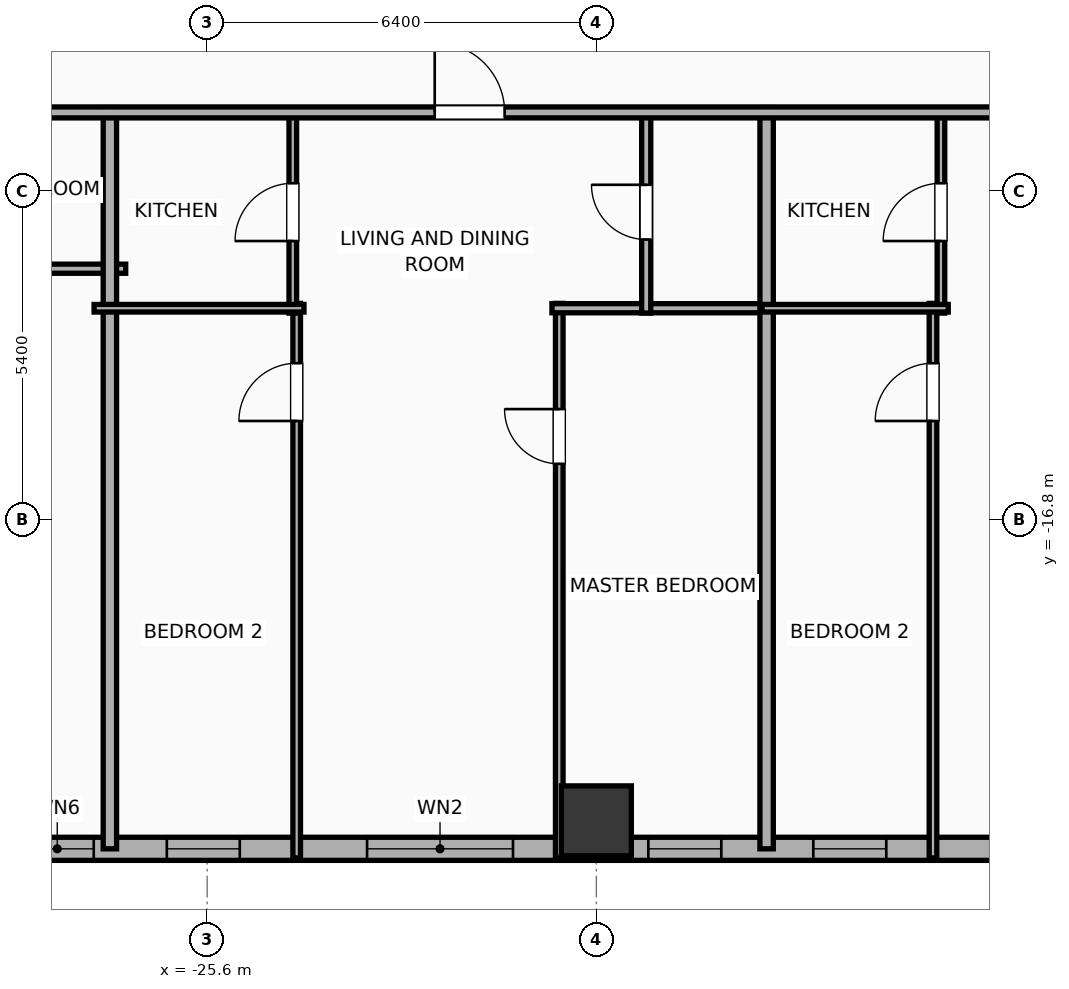
"""IFC4 building model, lengths in metres.
Left out: names, types, materials, properties, quantities, classifications, styles, units other than length and angle.
Written with IfcOpenShell. Run it as: python <this file> out.ifc"""

import sys

from ifc_helpers import new_model, si_unit, direction, frame, frame_2d, origin, origin_2d, place, context, subcontext, project, spatial, rectangle, hollow_rectangle, extrude, element, fill, save


model = new_model("IFC4")
c1 = context("Model", 3, precision=1e-05, world=origin(), true_north=direction((0.0, 1.0)))
c2 = subcontext(c1, "Body", "Model", "MODEL_VIEW")
j1 = project(units=[si_unit("LENGTHUNIT", "METRE"), si_unit("PLANEANGLEUNIT", "RADIAN")], contexts=[c1])
p1 = place(None, origin())
s1 = spatial("IfcSite", under=j1, at=p1, CompositionType="ELEMENT")
p2 = place(p1, origin())
s2 = spatial("IfcBuilding", under=s1, at=p2, CompositionType="ELEMENT")
p3 = place(p2, frame((0.0, 0.0, 41.6)))
s3 = spatial("IfcBuildingStorey", under=s2, at=p3, CompositionType="ELEMENT", Elevation=41.6)
p4 = place(p3, frame((-19.2, -21.75, 0.0), z_axis=(0.0, 0.0, 1.0), x_axis=(1.0, 0.0, 0.0)))
e1 = element("IfcColumn", 1, at=p4, inside=s3, PredefinedType="COLUMN", context=c2, shape_type="SweptSolid", body=[
    extrude(hollow_rectangle(XDim=1.15, YDim=1.15, WallThickness=0.04, at=origin_2d()), origin(), (0.0, 0.0, 1.0), 3.9),
])
p5 = place(p3, frame((22.381, -22.21, 0.0), z_axis=(0.0, 0.0, 1.0), x_axis=(-1.0, 0.0, 0.0)))
e2 = element("IfcWall", 2, at=p5, inside=s3, PredefinedType="ELEMENTEDWALL", context=c2, shape_type="SweptSolid", body=[
    extrude(rectangle(XDim=51.963, YDim=0.38, at=frame_2d((25.981, 0.0))), origin(), (0.0, 0.0, 1.0), 3.65),
])
p6 = place(p5, frame((42.952, 0.0, 0.75)))
e3 = element("IfcOpeningElement", 3, at=p6, cuts=e2, PredefinedType="OPENING", context=c2, shape_type="SweptSolid", body=[
    extrude(rectangle(XDim=2.4, YDim=2.1, at=frame_2d((1.2, 1.05))), frame((0.0, 0.2, 0.0), z_axis=(0.0, -1.0, 0.0), x_axis=(1.0, 0.0, 0.0)), (0.0, 0.0, 1.0), 0.4),
])
p7 = place(p5, frame((49.847, 0.0, 0.75)))
e4 = element("IfcOpeningElement", 4, at=p7, cuts=e2, PredefinedType="OPENING", context=c2, shape_type="SweptSolid", body=[
    extrude(rectangle(XDim=1.2, YDim=2.05, at=frame_2d((0.6, 1.025))), frame((0.0, 0.2, 0.0), z_axis=(0.0, -1.0, 0.0), x_axis=(1.0, 0.0, 0.0)), (0.0, 0.0, 1.0), 0.4),
])
p8 = place(p5, frame((47.445, 0.0, 0.75)))
e5 = element("IfcOpeningElement", 5, at=p8, cuts=e2, PredefinedType="OPENING", context=c2, shape_type="SweptSolid", body=[
    extrude(rectangle(XDim=1.2, YDim=2.05, at=frame_2d((0.6, 1.025))), frame((0.0, 0.2, 0.0), z_axis=(0.0, -1.0, 0.0), x_axis=(1.0, 0.0, 0.0)), (0.0, 0.0, 1.0), 0.4),
])
p9 = place(p5, frame((39.526, 0.0, 0.75)))
e6 = element("IfcOpeningElement", 6, at=p9, cuts=e2, PredefinedType="OPENING", context=c2, shape_type="SweptSolid", body=[
    extrude(rectangle(XDim=1.2, YDim=2.05, at=frame_2d((0.6, 1.025))), frame((0.0, 0.2, 0.0), z_axis=(0.0, -1.0, 0.0), x_axis=(1.0, 0.0, 0.0)), (0.0, 0.0, 1.0), 0.4),
])
p10 = place(p5, frame((33.018, 0.0, 0.75)))
e7 = element("IfcOpeningElement", 7, at=p10, cuts=e2, PredefinedType="OPENING", context=c2, shape_type="SweptSolid", body=[
    extrude(rectangle(XDim=1.2, YDim=2.05, at=frame_2d((0.6, 1.025))), frame((0.0, 0.2, 0.0), z_axis=(0.0, -1.0, 0.0), x_axis=(1.0, 0.0, 0.0)), (0.0, 0.0, 1.0), 0.4),
])
p11 = place(p5, frame((36.813, 0.0, 0.75)))
e8 = element("IfcOpeningElement", 8, at=p11, cuts=e2, PredefinedType="OPENING", context=c2, shape_type="SweptSolid", body=[
    extrude(rectangle(XDim=1.2, YDim=2.05, at=frame_2d((0.6, 1.025))), frame((0.0, 0.2, 0.0), z_axis=(0.0, -1.0, 0.0), x_axis=(1.0, 0.0, 0.0)), (0.0, 0.0, 1.0), 0.4),
])
p12 = place(p5, frame((28.886, 0.0, 0.75)))
e9 = element("IfcOpeningElement", 9, at=p12, cuts=e2, PredefinedType="OPENING", context=c2, shape_type="SweptSolid", body=[
    extrude(rectangle(XDim=1.2, YDim=2.05, at=frame_2d((0.6, 1.025))), frame((0.0, 0.2, 0.0), z_axis=(0.0, -1.0, 0.0), x_axis=(1.0, 0.0, 0.0)), (0.0, 0.0, 1.0), 0.4),
])
p13 = place(p5, frame((23.306, 0.0, 0.75)))
e10 = element("IfcOpeningElement", 10, at=p13, cuts=e2, PredefinedType="OPENING", context=c2, shape_type="SweptSolid", body=[
    extrude(rectangle(XDim=1.2, YDim=2.05, at=frame_2d((0.6, 1.025))), frame((0.0, 0.2, 0.0), z_axis=(0.0, -1.0, 0.0), x_axis=(1.0, 0.0, 0.0)), (0.0, 0.0, 1.0), 0.4),
])
p14 = place(p5, frame((26.056, 0.0, 0.75)))
e11 = element("IfcOpeningElement", 11, at=p14, cuts=e2, PredefinedType="OPENING", context=c2, shape_type="SweptSolid", body=[
    extrude(rectangle(XDim=1.2, YDim=2.05, at=frame_2d((0.6, 1.025))), frame((0.0, 0.2, 0.0), z_axis=(0.0, -1.0, 0.0), x_axis=(1.0, 0.0, 0.0)), (0.0, 0.0, 1.0), 0.4),
])
p15 = place(p5, frame((18.811, 0.0, 0.75)))
e12 = element("IfcOpeningElement", 12, at=p15, cuts=e2, PredefinedType="OPENING", context=c2, shape_type="SweptSolid", body=[
    extrude(rectangle(XDim=1.2, YDim=2.05, at=frame_2d((0.6, 1.025))), frame((0.0, 0.2, 0.0), z_axis=(0.0, -1.0, 0.0), x_axis=(1.0, 0.0, 0.0)), (0.0, 0.0, 1.0), 0.4),
])
p16 = place(p5, frame((14.602, 0.0, 0.75)))
e13 = element("IfcOpeningElement", 13, at=p16, cuts=e2, PredefinedType="OPENING", context=c2, shape_type="SweptSolid", body=[
    extrude(rectangle(XDim=1.2, YDim=2.05, at=frame_2d((0.6, 1.025))), frame((0.0, 0.2, 0.0), z_axis=(0.0, -1.0, 0.0), x_axis=(1.0, 0.0, 0.0)), (0.0, 0.0, 1.0), 0.4),
])
p17 = place(p5, frame((11.852, 0.0, 0.75)))
e14 = element("IfcOpeningElement", 14, at=p17, cuts=e2, PredefinedType="OPENING", context=c2, shape_type="SweptSolid", body=[
    extrude(rectangle(XDim=1.2, YDim=2.05, at=frame_2d((0.6, 1.025))), frame((0.0, 0.2, 0.0), z_axis=(0.0, -1.0, 0.0), x_axis=(1.0, 0.0, 0.0)), (0.0, 0.0, 1.0), 0.4),
])
p18 = place(p5, frame((8.316, 0.0, 0.75)))
e15 = element("IfcOpeningElement", 15, at=p18, cuts=e2, PredefinedType="OPENING", context=c2, shape_type="SweptSolid", body=[
    extrude(rectangle(XDim=1.2, YDim=2.05, at=frame_2d((0.6, 1.025))), frame((0.0, 0.2, 0.0), z_axis=(0.0, -1.0, 0.0), x_axis=(1.0, 0.0, 0.0)), (0.0, 0.0, 1.0), 0.4),
])
p19 = place(p5, frame((6.286, 0.0, 0.75)))
e16 = element("IfcOpeningElement", 16, at=p19, cuts=e2, PredefinedType="OPENING", context=c2, shape_type="SweptSolid", body=[
    extrude(rectangle(XDim=1.2, YDim=2.05, at=frame_2d((0.6, 1.025))), frame((0.0, 0.2, 0.0), z_axis=(0.0, -1.0, 0.0), x_axis=(1.0, 0.0, 0.0)), (0.0, 0.0, 1.0), 0.4),
])
p20 = place(p5, frame((3.737, 0.0, 0.75)))
e17 = element("IfcOpeningElement", 17, at=p20, cuts=e2, PredefinedType="OPENING", context=c2, shape_type="SweptSolid", body=[
    extrude(rectangle(XDim=1.2, YDim=2.05, at=frame_2d((0.6, 1.025))), frame((0.0, 0.2, 0.0), z_axis=(0.0, -1.0, 0.0), x_axis=(1.0, 0.0, 0.0)), (0.0, 0.0, 1.0), 0.4),
])
p21 = place(p5, frame((1.291, 0.0, 0.75)))
e18 = element("IfcOpeningElement", 18, at=p21, cuts=e2, PredefinedType="OPENING", context=c2, shape_type="SweptSolid", body=[
    extrude(rectangle(XDim=1.2, YDim=2.05, at=frame_2d((0.6, 1.025))), frame((0.0, 0.2, 0.0), z_axis=(0.0, -1.0, 0.0), x_axis=(1.0, 0.0, 0.0)), (0.0, 0.0, 1.0), 0.4),
])
p22 = place(p3, frame((-29.414, -12.67, 0.0), z_axis=(0.0, 0.0, 1.0), x_axis=(1.0, 0.0, 0.0)))
e19 = element("IfcWall", 19, at=p22, inside=s3, PredefinedType="PLUMBINGWALL", context=c2, shape_type="SweptSolid", body=[
    extrude(rectangle(XDim=2.474, YDim=0.15, at=frame_2d((1.237, 0.0))), origin(), (0.0, 0.0, 1.0), 3.65),
])
p23 = place(p3, frame((-27.2, -22.21, 0.0), z_axis=(0.0, 0.0, 1.0), x_axis=(0.0, 1.0, 0.0)))
e20 = element("IfcWall", 20, at=p23, inside=s3, PredefinedType="PARTITIONING", context=c2, shape_type="SweptSolid", body=[
    extrude(rectangle(XDim=12.19, YDim=0.22, at=frame_2d((6.095, 0.0))), origin(), (0.0, 0.0, 1.0), 3.65),
])
p24 = place(p3, frame((-24.128, -22.36, 0.0), z_axis=(0.0, 0.0, 1.0), x_axis=(0.0, 1.0, 0.0)))
e21 = element("IfcWall", 21, at=p24, inside=s3, PredefinedType="PARTITIONING", context=c2, shape_type="SweptSolid", body=[
    extrude(rectangle(XDim=9.12, YDim=0.125, at=frame_2d((4.56, 0.0))), origin(), (0.0, 0.0, 1.0), 3.65),
])
p25 = place(p24, frame((7.186, 0.0, 0.0)))
e22 = element("IfcOpeningElement", 22, at=p25, cuts=e21, PredefinedType="OPENING", context=c2, shape_type="SweptSolid", body=[
    extrude(rectangle(XDim=0.95, YDim=2.05, at=frame_2d((0.475, 1.025))), frame((0.0, 0.073, 0.0), z_axis=(0.0, -1.0, 0.0), x_axis=(1.0, 0.0, 0.0)), (0.0, 0.0, 1.0), 0.145),
])
p26 = place(p3, frame((-19.81, -22.36, 0.0), z_axis=(0.0, 0.0, 1.0), x_axis=(0.0, 1.0, 0.0)))
e23 = element("IfcWall", 23, at=p26, inside=s3, PredefinedType="PARTITIONING", context=c2, shape_type="SweptSolid", body=[
    extrude(rectangle(XDim=9.12, YDim=0.125, at=frame_2d((4.56, 0.0))), origin(), (0.0, 0.0, 1.0), 3.65),
])
p27 = place(p26, frame((6.481, 0.0, 0.0)))
e24 = element("IfcOpeningElement", 24, at=p27, cuts=e23, PredefinedType="OPENING", context=c2, shape_type="SweptSolid", body=[
    extrude(rectangle(XDim=0.9, YDim=2.05, at=frame_2d((0.45, 1.025))), frame((0.0, 0.073, 0.0), z_axis=(0.0, -1.0, 0.0), x_axis=(1.0, 0.0, 0.0)), (0.0, 0.0, 1.0), 0.145),
])
p28 = place(p3, frame((-19.93, -13.32, 0.0), z_axis=(0.0, 0.0, 1.0), x_axis=(1.0, 0.0, 0.0)))
e25 = element("IfcWall", 25, at=p28, inside=s3, PredefinedType="PLUMBINGWALL", context=c2, shape_type="SweptSolid", body=[
    extrude(rectangle(XDim=3.605, YDim=0.15, at=frame_2d((1.802, 0.0))), origin(), (0.0, 0.0, 1.0), 3.65),
])
p29 = place(p3, frame((-24.192, -13.4, 0.0), z_axis=(0.0, 0.0, 1.0), x_axis=(0.0, 1.0, 0.0)))
e26 = element("IfcWall", 26, at=p29, inside=s3, PredefinedType="PARTITIONING", context=c2, shape_type="SweptSolid", body=[
    extrude(rectangle(XDim=3.32, YDim=0.125, at=frame_2d((1.66, 0.0))), origin(), (0.0, 0.0, 1.0), 3.65),
])
p30 = place(p29, frame((1.185, 0.0, 0.0)))
e27 = element("IfcOpeningElement", 27, at=p30, cuts=e26, PredefinedType="OPENING", context=c2, shape_type="SweptSolid", body=[
    extrude(rectangle(XDim=0.95, YDim=2.05, at=frame_2d((0.475, 1.025))), frame((0.0, 0.073, 0.0), z_axis=(0.0, -1.0, 0.0), x_axis=(1.0, 0.0, 0.0)), (0.0, 0.0, 1.0), 0.145),
])
p31 = place(p3, frame((-27.46, -13.32, 0.0), z_axis=(0.0, 0.0, 1.0), x_axis=(1.0, 0.0, 0.0)))
e28 = element("IfcWall", 28, at=p31, inside=s3, PredefinedType="PARTITIONING", context=c2, shape_type="SweptSolid", body=[
    extrude(rectangle(XDim=3.452, YDim=0.125, at=frame_2d((1.726, 0.0))), origin(), (0.0, 0.0, 1.0), 3.65),
])
p32 = place(p3, frame((-18.38, -13.4, 0.0), z_axis=(0.0, 0.0, 1.0), x_axis=(0.0, 1.0, 0.0)))
e29 = element("IfcWall", 29, at=p32, inside=s3, PredefinedType="PLUMBINGWALL", context=c2, shape_type="SweptSolid", body=[
    extrude(rectangle(XDim=3.32, YDim=0.15, at=frame_2d((1.66, 0.0))), origin(), (0.0, 0.0, 1.0), 3.65),
])
p33 = place(p32, frame((1.21, 0.0, 0.0)))
e30 = element("IfcOpeningElement", 30, at=p33, cuts=e29, PredefinedType="OPENING", context=c2, shape_type="SweptSolid", body=[
    extrude(rectangle(XDim=0.9, YDim=2.05, at=frame_2d((0.45, 1.025))), frame((0.0, 0.085, 0.0), z_axis=(0.0, -1.0, 0.0), x_axis=(1.0, 0.0, 0.0)), (0.0, 0.0, 1.0), 0.17),
])
p34 = place(p3, frame((-16.4, -22.21, 0.0), z_axis=(0.0, 0.0, 1.0), x_axis=(0.0, 1.0, 0.0)))
e31 = element("IfcWall", 31, at=p34, inside=s3, PredefinedType="PARTITIONING", context=c2, shape_type="SweptSolid", body=[
    extrude(rectangle(XDim=12.19, YDim=0.22, at=frame_2d((6.095, 0.0))), origin(), (0.0, 0.0, 1.0), 3.65),
])
p35 = place(p3, frame((-13.664, -22.36, 0.0), z_axis=(0.0, 0.0, 1.0), x_axis=(0.0, 1.0, 0.0)))
e32 = element("IfcWall", 32, at=p35, inside=s3, PredefinedType="PARTITIONING", context=c2, shape_type="SweptSolid", body=[
    extrude(rectangle(XDim=9.12, YDim=0.125, at=frame_2d((4.56, 0.0))), origin(), (0.0, 0.0, 1.0), 3.65),
])
p36 = place(p35, frame((7.186, 0.0, 0.0)))
e33 = element("IfcOpeningElement", 33, at=p36, cuts=e32, PredefinedType="OPENING", context=c2, shape_type="SweptSolid", body=[
    extrude(rectangle(XDim=0.95, YDim=2.05, at=frame_2d((0.475, 1.025))), frame((0.0, 0.073, 0.0), z_axis=(0.0, -1.0, 0.0), x_axis=(1.0, 0.0, 0.0)), (0.0, 0.0, 1.0), 0.145),
])
p37 = place(p3, frame((-13.533, -13.4, 0.0), z_axis=(0.0, 0.0, 1.0), x_axis=(0.0, 1.0, 0.0)))
e34 = element("IfcWall", 34, at=p37, inside=s3, PredefinedType="PARTITIONING", context=c2, shape_type="SweptSolid", body=[
    extrude(rectangle(XDim=3.32, YDim=0.125, at=frame_2d((1.66, 0.0))), origin(), (0.0, 0.0, 1.0), 3.65),
])
p38 = place(p37, frame((1.185, 0.0, 0.0)))
e35 = element("IfcOpeningElement", 35, at=p38, cuts=e34, PredefinedType="OPENING", context=c2, shape_type="SweptSolid", body=[
    extrude(rectangle(XDim=0.95, YDim=2.05, at=frame_2d((0.475, 1.025))), frame((0.0, 0.073, 0.0), z_axis=(0.0, -1.0, 0.0), x_axis=(1.0, 0.0, 0.0)), (0.0, 0.0, 1.0), 0.145),
])
p39 = place(p3, frame((-16.475, -13.32, 0.0), z_axis=(0.0, 0.0, 1.0), x_axis=(1.0, 0.0, 0.0)))
e36 = element("IfcWall", 36, at=p39, inside=s3, PredefinedType="PARTITIONING", context=c2, shape_type="SweptSolid", body=[
    extrude(rectangle(XDim=3.062, YDim=0.125, at=frame_2d((1.531, 0.0))), origin(), (0.0, 0.0, 1.0), 3.65),
])
p40 = place(p3, frame((-33.41, -10.1, 0.0), z_axis=(0.0, 0.0, 1.0), x_axis=(1.0, 0.0, 0.0)))
e37 = element("IfcWall", 37, at=p40, inside=s3, PredefinedType="PARTITIONING", context=c2, shape_type="SweptSolid", body=[
    extrude(rectangle(XDim=59.62, YDim=0.18, at=frame_2d((29.81, 0.0))), origin(), (0.0, 0.0, 1.0), 3.65),
])
p41 = place(p40, frame((2.746, 0.0, 0.0)))
e38 = element("IfcOpeningElement", 38, at=p41, cuts=e37, PredefinedType="OPENING", context=c2, shape_type="SweptSolid", body=[
    extrude(rectangle(XDim=0.9, YDim=2.05, at=frame_2d((0.45, 1.025))), frame((0.0, 0.1, 0.0), z_axis=(0.0, -1.0, 0.0), x_axis=(1.0, 0.0, 0.0)), (0.0, 0.0, 1.0), 0.2),
])
p42 = place(p40, frame((11.552, 0.0, 0.0)))
e39 = element("IfcOpeningElement", 39, at=p42, cuts=e37, PredefinedType="OPENING", context=c2, shape_type="SweptSolid", body=[
    extrude(rectangle(XDim=1.15, YDim=2.05, at=frame_2d((0.575, 1.025))), frame((0.0, 0.1, 0.0), z_axis=(0.0, -1.0, 0.0), x_axis=(1.0, 0.0, 0.0)), (0.0, 0.0, 1.0), 0.2),
])
p43 = place(p40, frame((22.379, 0.0, 0.0)))
e40 = element("IfcOpeningElement", 40, at=p43, cuts=e37, PredefinedType="OPENING", context=c2, shape_type="SweptSolid", body=[
    extrude(rectangle(XDim=1.15, YDim=2.05, at=frame_2d((0.575, 1.025))), frame((0.0, 0.1, 0.0), z_axis=(0.0, -1.0, 0.0), x_axis=(1.0, 0.0, 0.0)), (0.0, 0.0, 1.0), 0.2),
])
p44 = place(p40, frame((31.28, 0.0, 0.0)))
e41 = element("IfcOpeningElement", 41, at=p44, cuts=e37, PredefinedType="OPENING", context=c2, shape_type="SweptSolid", body=[
    extrude(rectangle(XDim=1.15, YDim=2.05, at=frame_2d((0.575, 1.025))), frame((0.0, 0.1, 0.0), z_axis=(0.0, -1.0, 0.0), x_axis=(1.0, 0.0, 0.0)), (0.0, 0.0, 1.0), 0.2),
])
p45 = place(p40, frame((36.02, 0.0, 0.0)))
e42 = element("IfcOpeningElement", 42, at=p45, cuts=e37, PredefinedType="OPENING", context=c2, shape_type="SweptSolid", body=[
    extrude(rectangle(XDim=0.9, YDim=2.05, at=frame_2d((0.45, 1.025))), frame((0.0, 0.1, 0.0), z_axis=(0.0, -1.0, 0.0), x_axis=(1.0, 0.0, 0.0)), (0.0, 0.0, 1.0), 0.2),
])
p46 = place(p40, frame((40.044, 0.0, 0.0)))
e43 = element("IfcOpeningElement", 43, at=p46, cuts=e37, PredefinedType="OPENING", context=c2, shape_type="SweptSolid", body=[
    extrude(rectangle(XDim=1.15, YDim=2.05, at=frame_2d((0.575, 1.025))), frame((0.0, 0.1, 0.0), z_axis=(0.0, -1.0, 0.0), x_axis=(1.0, 0.0, 0.0)), (0.0, 0.0, 1.0), 0.2),
])
p47 = place(p40, frame((45.613, 0.0, 0.0)))
e44 = element("IfcOpeningElement", 44, at=p47, cuts=e37, PredefinedType="OPENING", context=c2, shape_type="SweptSolid", body=[
    extrude(rectangle(XDim=1.15, YDim=2.05, at=frame_2d((0.575, 1.025))), frame((0.0, 0.1, 0.0), z_axis=(0.0, -1.0, 0.0), x_axis=(1.0, 0.0, 0.0)), (0.0, 0.0, 1.0), 0.2),
])
p48 = place(p40, frame((54.174, 0.0, 0.0)))
e45 = element("IfcOpeningElement", 45, at=p48, cuts=e37, PredefinedType="OPENING", context=c2, shape_type="SweptSolid", body=[
    extrude(rectangle(XDim=1.15, YDim=2.05, at=frame_2d((0.575, 1.025))), frame((0.0, 0.1, 0.0), z_axis=(0.0, -1.0, 0.0), x_axis=(1.0, 0.0, 0.0)), (0.0, 0.0, 1.0), 0.2),
])
p49 = place(p6, origin())
e46 = element("IfcWindow", 46, at=p49, inside=s3, PartitioningType="SINGLE_PANEL", PredefinedType="WINDOW", context=c2, shape_type="SweptSolid", body=[
    extrude(rectangle(XDim=2.4, YDim=2.1, at=frame_2d((1.2, 1.05))), frame((0.0, 0.03, 0.0), z_axis=(0.0, -1.0, 0.0), x_axis=(1.0, 0.0, 0.0)), (0.0, 0.0, 1.0), 0.06),
])
fill(e3, e46)
p50 = place(p7, origin())
e47 = element("IfcWindow", 47, at=p50, inside=s3, PartitioningType="SINGLE_PANEL", PredefinedType="WINDOW", context=c2, shape_type="SweptSolid", body=[
    extrude(rectangle(XDim=1.2, YDim=2.05, at=frame_2d((0.6, 1.025))), frame((0.0, 0.03, 0.0), z_axis=(0.0, -1.0, 0.0), x_axis=(1.0, 0.0, 0.0)), (0.0, 0.0, 1.0), 0.06),
])
fill(e4, e47)
p51 = place(p8, origin())
e48 = element("IfcWindow", 48, at=p51, inside=s3, PartitioningType="SINGLE_PANEL", PredefinedType="WINDOW", context=c2, shape_type="SweptSolid", body=[
    extrude(rectangle(XDim=1.2, YDim=2.05, at=frame_2d((0.6, 1.025))), frame((0.0, 0.03, 0.0), z_axis=(0.0, -1.0, 0.0), x_axis=(1.0, 0.0, 0.0)), (0.0, 0.0, 1.0), 0.06),
])
fill(e5, e48)
p52 = place(p9, origin())
e49 = element("IfcWindow", 49, at=p52, inside=s3, PartitioningType="SINGLE_PANEL", PredefinedType="WINDOW", context=c2, shape_type="SweptSolid", body=[
    extrude(rectangle(XDim=1.2, YDim=2.05, at=frame_2d((0.6, 1.025))), frame((0.0, 0.03, 0.0), z_axis=(0.0, -1.0, 0.0), x_axis=(1.0, 0.0, 0.0)), (0.0, 0.0, 1.0), 0.06),
])
fill(e6, e49)
p53 = place(p11, origin())
e50 = element("IfcWindow", 50, at=p53, inside=s3, PartitioningType="SINGLE_PANEL", PredefinedType="WINDOW", context=c2, shape_type="SweptSolid", body=[
    extrude(rectangle(XDim=1.2, YDim=2.05, at=frame_2d((0.6, 1.025))), frame((0.0, 0.03, 0.0), z_axis=(0.0, -1.0, 0.0), x_axis=(1.0, 0.0, 0.0)), (0.0, 0.0, 1.0), 0.06),
])
fill(e8, e50)
p54 = place(p25, origin())
e51 = element("IfcDoor", 51, at=p54, inside=s3, OperationType="SINGLE_SWING_LEFT", PredefinedType="DOOR", context=c2, shape_type="SweptSolid", body=[
    extrude(rectangle(XDim=0.95, YDim=2.05, at=frame_2d((0.475, 1.025))), frame((0.0, 0.025, 0.0), z_axis=(0.0, -1.0, 0.0), x_axis=(1.0, 0.0, 0.0)), (0.0, 0.0, 1.0), 0.05),
])
fill(e22, e51)
p55 = place(p27, origin())
e52 = element("IfcDoor", 52, at=p55, inside=s3, OperationType="SINGLE_SWING_RIGHT", PredefinedType="DOOR", context=c2, shape_type="SweptSolid", body=[
    extrude(rectangle(XDim=0.9, YDim=2.05, at=frame_2d((0.45, 1.025))), frame((0.0, 0.025, 0.0), z_axis=(0.0, -1.0, 0.0), x_axis=(1.0, 0.0, 0.0)), (0.0, 0.0, 1.0), 0.05),
])
fill(e24, e52)
p56 = place(p30, origin())
e53 = element("IfcDoor", 53, at=p56, inside=s3, OperationType="SINGLE_SWING_LEFT", PredefinedType="DOOR", context=c2, shape_type="SweptSolid", body=[
    extrude(rectangle(XDim=0.95, YDim=2.05, at=frame_2d((0.475, 1.025))), frame((0.0, 0.025, 0.0), z_axis=(0.0, -1.0, 0.0), x_axis=(1.0, 0.0, 0.0)), (0.0, 0.0, 1.0), 0.05),
])
fill(e27, e53)
p57 = place(p33, origin())
e54 = element("IfcDoor", 54, at=p57, inside=s3, OperationType="SINGLE_SWING_RIGHT", PredefinedType="DOOR", context=c2, shape_type="SweptSolid", body=[
    extrude(rectangle(XDim=0.9, YDim=2.05, at=frame_2d((0.45, 1.025))), frame((0.0, 0.025, 0.0), z_axis=(0.0, -1.0, 0.0), x_axis=(1.0, 0.0, 0.0)), (0.0, 0.0, 1.0), 0.05),
])
fill(e30, e54)
p58 = place(p36, origin())
e55 = element("IfcDoor", 55, at=p58, inside=s3, OperationType="SINGLE_SWING_LEFT", PredefinedType="DOOR", context=c2, shape_type="SweptSolid", body=[
    extrude(rectangle(XDim=0.95, YDim=2.05, at=frame_2d((0.475, 1.025))), frame((0.0, 0.025, 0.0), z_axis=(0.0, -1.0, 0.0), x_axis=(1.0, 0.0, 0.0)), (0.0, 0.0, 1.0), 0.05),
])
fill(e33, e55)
p59 = place(p38, origin())
e56 = element("IfcDoor", 56, at=p59, inside=s3, OperationType="SINGLE_SWING_LEFT", PredefinedType="DOOR", context=c2, shape_type="SweptSolid", body=[
    extrude(rectangle(XDim=0.95, YDim=2.05, at=frame_2d((0.475, 1.025))), frame((0.0, 0.025, 0.0), z_axis=(0.0, -1.0, 0.0), x_axis=(1.0, 0.0, 0.0)), (0.0, 0.0, 1.0), 0.05),
])
fill(e35, e56)
p60 = place(p42, origin())
e57 = element("IfcDoor", 57, at=p60, inside=s3, OperationType="SINGLE_SWING_LEFT", PredefinedType="DOOR", context=c2, shape_type="SweptSolid", body=[
    extrude(rectangle(XDim=1.15, YDim=2.05, at=frame_2d((0.575, 1.025))), frame((0.0, 0.025, 0.0), z_axis=(0.0, -1.0, 0.0), x_axis=(1.0, 0.0, 0.0)), (0.0, 0.0, 1.0), 0.05),
])
fill(e39, e57)
save(model, sys.argv[1])
